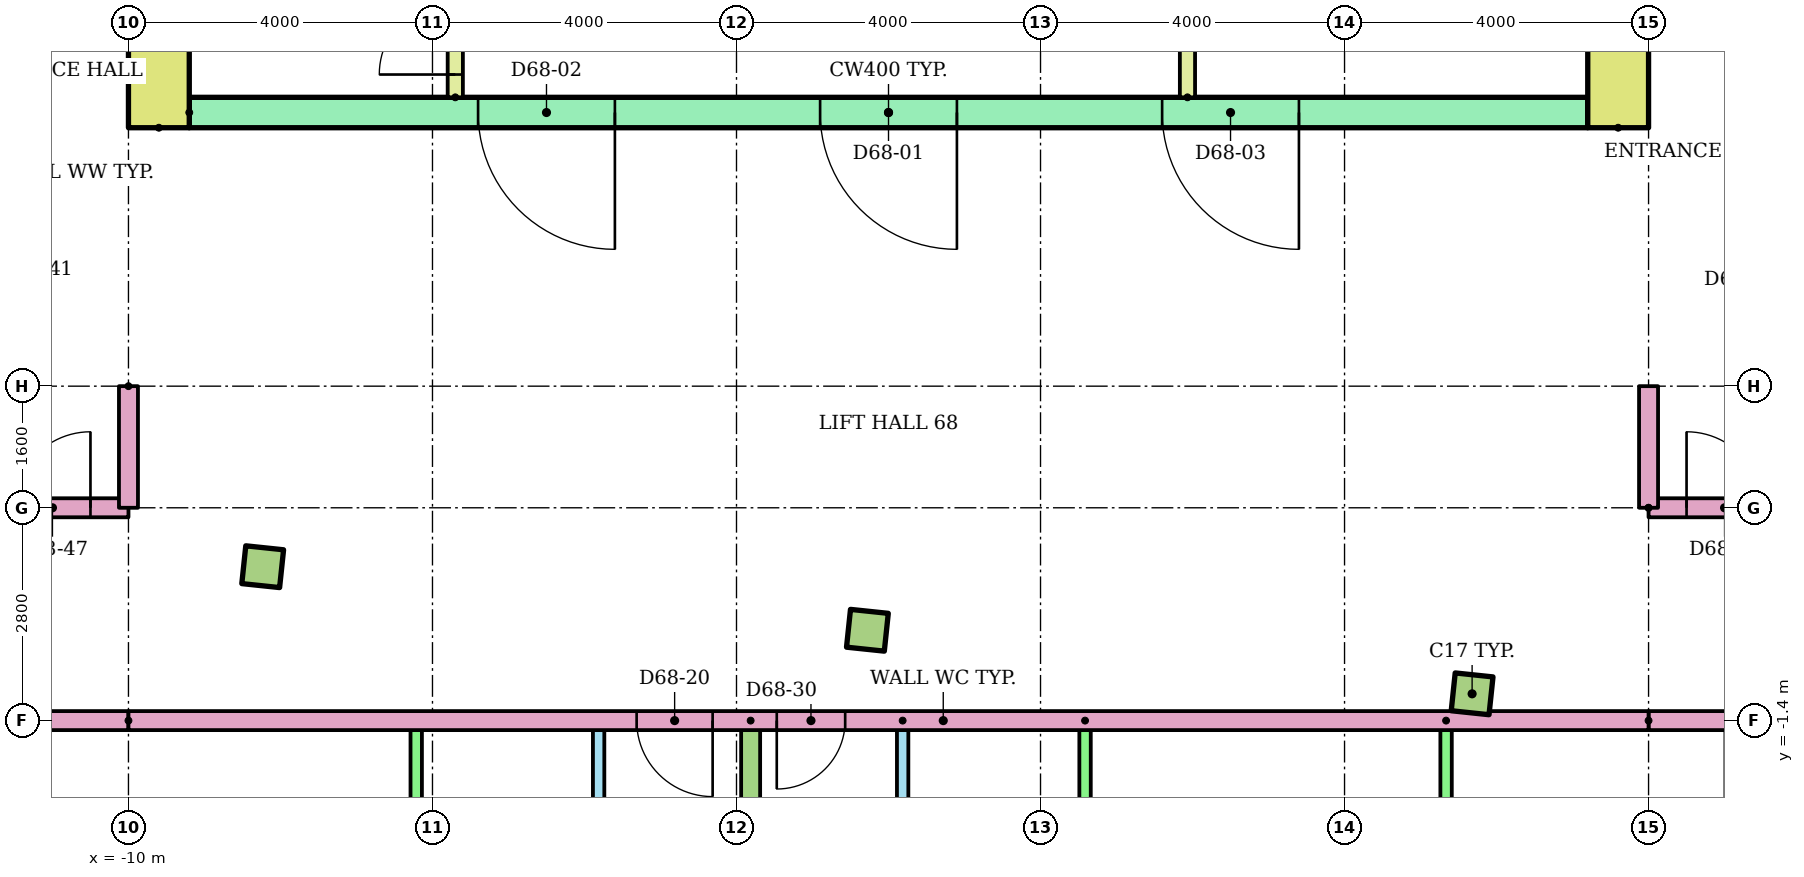
"""IFC4 building model, lengths in metres.
Left out: names, types, materials, properties, quantities, classifications, styles, units other than length and angle.
Written with IfcOpenShell. Run it as: python <this file> out.ifc"""

import sys

from ifc_helpers import new_model, si_unit, direction, frame, frame_2d, origin, origin_2d, place, context, subcontext, project, spatial, rectangle, extrude, element, fill, save


model = new_model("IFC4")
c1 = context("Model", 3, precision=1e-05, world=origin(), true_north=direction((0.0, 1.0)))
c2 = subcontext(c1, "Body", "Model", "MODEL_VIEW")
j1 = project(units=[si_unit("LENGTHUNIT", "METRE"), si_unit("PLANEANGLEUNIT", "RADIAN")], contexts=[c1])
p1 = place(None, origin())
s1 = spatial("IfcSite", under=j1, at=p1, CompositionType="ELEMENT")
p2 = place(p1, origin())
s2 = spatial("IfcBuilding", under=s1, at=p2, CompositionType="ELEMENT")
p3 = place(p2, frame((0.0, 0.0, 262.7)))
s3 = spatial("IfcBuildingStorey", under=s2, at=p3, CompositionType="ELEMENT", Elevation=262.7)
for number, where, z_axis, x_axis in (
    (1, (-8.234, 0.625, 0.0), (0.0, 0.0, 1.0), (0.995, -0.105, 0.0)),
    (2, (-0.278, -0.211, 0.0), (0.0, 0.0, 1.0), (0.995, -0.105, 0.0)),
    (3, (7.678, -1.048, 0.0), (0.0, 0.0, 1.0), (0.995, -0.105, 0.0)),
):
    element("IfcColumn", number, at=place(p3, frame(where, z_axis=z_axis, x_axis=x_axis)), inside=s3, PredefinedType="COLUMN", context=c2, shape_type="SweptSolid", body=[
        extrude(rectangle(XDim=0.5, YDim=0.5, at=origin_2d()), origin(), (0.0, 0.0, 1.0), 3.2),
    ])
for number, where, z_axis, x_axis in (
    (4, (-9.6, 6.4, 0.0), (0.0, 0.0, 1.0), (0.0, 1.0, 0.0)),
    (5, (9.6, 6.4, 0.0), (0.0, 0.0, 1.0), (0.0, 1.0, 0.0)),
):
    element("IfcWall", number, at=place(p3, frame(where, z_axis=z_axis, x_axis=x_axis)), inside=s3, PredefinedType="SHEAR", context=c2, shape_type="SweptSolid", body=[
        extrude(rectangle(XDim=13.6, YDim=0.8, at=frame_2d((6.8, 0.0))), origin(), (0.0, 0.0, 1.0), 2.92),
    ])
p4 = place(p3, frame((-9.2, 6.6, 0.0)))
e6 = element("IfcWall", 6, at=p4, inside=s3, PredefinedType="SHEAR", context=c2, shape_type="SweptSolid", body=[
    extrude(rectangle(XDim=18.4, YDim=0.4, at=frame_2d((9.2, 0.0))), origin(), (0.0, 0.0, 1.0), 2.92),
])
p5 = place(p4, frame((8.3, 0.0, 0.0)))
e7 = element("IfcOpeningElement", 7, at=p5, cuts=e6, PredefinedType="OPENING", context=c2, shape_type="SweptSolid", body=[
    extrude(rectangle(XDim=1.8, YDim=2.1, at=frame_2d((0.9, 1.05))), frame((0.0, 0.21, 0.0), z_axis=(0.0, -1.0, 0.0), x_axis=(1.0, 0.0, 0.0)), (0.0, 0.0, 1.0), 0.42),
])
p6 = place(p4, frame((3.8, 0.0, 0.0)))
e8 = element("IfcOpeningElement", 8, at=p6, cuts=e6, PredefinedType="OPENING", context=c2, shape_type="SweptSolid", body=[
    extrude(rectangle(XDim=1.8, YDim=2.1, at=frame_2d((0.9, 1.05))), frame((0.0, 0.21, 0.0), z_axis=(0.0, -1.0, 0.0), x_axis=(1.0, 0.0, 0.0)), (0.0, 0.0, 1.0), 0.42),
])
p7 = place(p4, frame((12.8, 0.0, 0.0)))
e9 = element("IfcOpeningElement", 9, at=p7, cuts=e6, PredefinedType="OPENING", context=c2, shape_type="SweptSolid", body=[
    extrude(rectangle(XDim=1.8, YDim=2.1, at=frame_2d((0.9, 1.05))), frame((0.0, 0.21, 0.0), z_axis=(0.0, -1.0, 0.0), x_axis=(1.0, 0.0, 0.0)), (0.0, 0.0, 1.0), 0.42),
])
p8 = place(p3, frame((3.933, 6.8, 0.0), z_axis=(0.0, 0.0, 1.0), x_axis=(0.0, 1.0, 0.0)))
e10 = element("IfcWall", 10, at=p8, inside=s3, PredefinedType="PARTITIONING", context=c2, shape_type="SweptSolid", body=[
    extrude(rectangle(XDim=3.3, YDim=0.2, at=frame_2d((1.65, 0.0))), origin(), (0.0, 0.0, 1.0), 2.92),
])
p9 = place(p8, frame((1.1, 0.0, 0.0)))
e11 = element("IfcOpeningElement", 11, at=p9, cuts=e10, PredefinedType="OPENING", context=c2, shape_type="SweptSolid", body=[
    extrude(rectangle(XDim=1.1, YDim=2.1, at=frame_2d((0.55, 1.05))), frame((0.0, 0.11, 0.0), z_axis=(0.0, -1.0, 0.0), x_axis=(1.0, 0.0, 0.0)), (0.0, 0.0, 1.0), 0.22),
])
p10 = place(p3, frame((-5.7, 6.8, 0.0), z_axis=(0.0, 0.0, 1.0), x_axis=(0.0, 1.0, 0.0)))
e12 = element("IfcWall", 12, at=p10, inside=s3, PredefinedType="PARTITIONING", context=c2, shape_type="SweptSolid", body=[
    extrude(rectangle(XDim=1.6, YDim=0.2, at=frame_2d((0.8, 0.0))), origin(), (0.0, 0.0, 1.0), 2.92),
])
p11 = place(p10, frame((0.3, 0.0, 0.0)))
e13 = element("IfcOpeningElement", 13, at=p11, cuts=e12, PredefinedType="OPENING", context=c2, shape_type="SweptSolid", body=[
    extrude(rectangle(XDim=1.0, YDim=2.1, at=frame_2d((0.5, 1.05))), frame((0.0, 0.11, 0.0), z_axis=(0.0, -1.0, 0.0), x_axis=(1.0, 0.0, 0.0)), (0.0, 0.0, 1.0), 0.22),
])
p12 = place(p3, frame((-3.814, -7.047, 0.0), z_axis=(0.0, 0.0, 1.0), x_axis=(0.0, 1.0, 0.0)))
e14 = element("IfcWall", 14, at=p12, inside=s3, PredefinedType="PARTITIONING", context=c2, shape_type="SweptSolid", body=[
    extrude(rectangle(XDim=5.647, YDim=0.15, at=frame_2d((2.823, 0.0))), origin(), (0.0, 0.0, 1.0), 2.4),
])
p13 = place(p12, frame((3.697, 0.0, 0.0)))
e15 = element("IfcOpeningElement", 15, at=p13, cuts=e14, PredefinedType="OPENING", context=c2, shape_type="SweptSolid", body=[
    extrude(rectangle(XDim=0.9, YDim=2.1, at=frame_2d((0.45, 1.05))), frame((0.0, 0.085, 0.0), z_axis=(0.0, -1.0, 0.0), x_axis=(1.0, 0.0, 0.0)), (0.0, 0.0, 1.0), 0.17),
])
p14 = place(p12, frame((0.923, 0.0, 0.0)))
e16 = element("IfcOpeningElement", 16, at=p14, cuts=e14, PredefinedType="OPENING", context=c2, shape_type="SweptSolid", body=[
    extrude(rectangle(XDim=0.8, YDim=2.1, at=frame_2d((0.4, 1.05))), frame((0.0, 0.085, 0.0), z_axis=(0.0, -1.0, 0.0), x_axis=(1.0, 0.0, 0.0)), (0.0, 0.0, 1.0), 0.17),
])
p15 = place(p3, frame((-6.214, -7.047, 0.0), z_axis=(0.0, 0.0, 1.0), x_axis=(0.0, 1.0, 0.0)))
e17 = element("IfcWall", 17, at=p15, inside=s3, PredefinedType="PARTITIONING", context=c2, shape_type="SweptSolid", body=[
    extrude(rectangle(XDim=5.647, YDim=0.15, at=frame_2d((2.823, 0.0))), origin(), (0.0, 0.0, 1.0), 2.4),
])
p16 = place(p3, frame((0.186, -1.4, 0.0), z_axis=(0.0, 0.0, 1.0), x_axis=(0.0, -1.0, 0.0)))
e18 = element("IfcWall", 18, at=p16, inside=s3, PredefinedType="PARTITIONING", context=c2, shape_type="SweptSolid", body=[
    extrude(rectangle(XDim=7.484, YDim=0.15, at=frame_2d((3.742, 0.0))), origin(), (0.0, 0.0, 1.0), 2.4),
])
p17 = place(p16, frame((1.55, 0.0, 0.0)))
e19 = element("IfcOpeningElement", 19, at=p17, cuts=e18, PredefinedType="OPENING", context=c2, shape_type="SweptSolid", body=[
    extrude(rectangle(XDim=0.9, YDim=2.1, at=frame_2d((0.45, 1.05))), frame((0.0, 0.085, 0.0), z_axis=(0.0, -1.0, 0.0), x_axis=(1.0, 0.0, 0.0)), (0.0, 0.0, 1.0), 0.17),
])
p18 = place(p16, frame((4.966, 0.0, 0.0)))
e20 = element("IfcOpeningElement", 20, at=p18, cuts=e18, PredefinedType="OPENING", context=c2, shape_type="SweptSolid", body=[
    extrude(rectangle(XDim=0.8, YDim=2.1, at=frame_2d((0.4, 1.05))), frame((0.0, 0.085, 0.0), z_axis=(0.0, -1.0, 0.0), x_axis=(1.0, 0.0, 0.0)), (0.0, 0.0, 1.0), 0.17),
])
for number, where, z_axis, x_axis in (
    (21, (2.586, -1.4, 0.0), (0.0, 0.0, 1.0), (0.0, -1.0, 0.0)),
    (22, (7.336, -1.4, 0.0), (0.0, 0.0, 1.0), (0.0, -1.0, 0.0)),
):
    element("IfcWall", number, at=place(p3, frame(where, z_axis=z_axis, x_axis=x_axis)), inside=s3, PredefinedType="PARTITIONING", context=c2, shape_type="SweptSolid", body=[
        extrude(rectangle(XDim=7.484, YDim=0.15, at=frame_2d((3.742, 0.0))), origin(), (0.0, 0.0, 1.0), 2.4),
    ])
p19 = place(p3, frame((-1.814, -1.4, 0.0), z_axis=(0.0, 0.0, 1.0), x_axis=(0.0, -1.0, 0.0)))
e23 = element("IfcWall", 23, at=p19, inside=s3, PredefinedType="PARTITIONING", context=c2, shape_type="SweptSolid", body=[
    extrude(rectangle(XDim=13.341, YDim=0.25, at=frame_2d((6.67, 0.0))), origin(), (0.0, 0.0, 1.0), 2.4),
])
p20 = place(p3, frame((-10.0, -1.4, 0.0), z_axis=(0.0, 0.0, 1.0), x_axis=(-1.0, 0.0, 0.0)))
e24 = element("IfcWall", 24, at=p20, inside=s3, PredefinedType="PARTITIONING", context=c2, shape_type="SweptSolid", body=[
    extrude(rectangle(XDim=13.56, YDim=0.25, at=frame_2d((6.78, 0.0))), origin(), (0.0, 0.0, 1.0), 2.4),
])
p21 = place(p3, frame((25.0, -1.4, 0.0), z_axis=(0.0, 0.0, 1.0), x_axis=(-1.0, 0.0, 0.0)))
e25 = element("IfcWall", 25, at=p21, inside=s3, PredefinedType="PARTITIONING", context=c2, shape_type="SweptSolid", body=[
    extrude(rectangle(XDim=15.0, YDim=0.25, at=frame_2d((7.5, 0.0))), origin(), (0.0, 0.0, 1.0), 2.4),
])
p22 = place(p21, frame((9.658, 0.0, 0.0)))
e26 = element("IfcOpeningElement", 26, at=p22, cuts=e25, PredefinedType="OPENING", context=c2, shape_type="SweptSolid", body=[
    extrude(rectangle(XDim=0.9, YDim=2.1, at=frame_2d((0.45, 1.05))), frame((0.0, 0.135, 0.0), z_axis=(0.0, -1.0, 0.0), x_axis=(1.0, 0.0, 0.0)), (0.0, 0.0, 1.0), 0.27),
])
p23 = place(p3, frame((-23.265, 1.4, 0.0)))
e27 = element("IfcWall", 27, at=p23, inside=s3, PredefinedType="PARTITIONING", context=c2, shape_type="SweptSolid", body=[
    extrude(rectangle(XDim=13.265, YDim=0.25, at=frame_2d((6.633, 0.0))), origin(), (0.0, 0.0, 1.0), 2.4),
])
p24 = place(p23, frame((11.765, 0.0, 0.0)))
e28 = element("IfcOpeningElement", 28, at=p24, cuts=e27, PredefinedType="OPENING", context=c2, shape_type="SweptSolid", body=[
    extrude(rectangle(XDim=1.0, YDim=2.1, at=frame_2d((0.5, 1.05))), frame((0.0, 0.135, 0.0), z_axis=(0.0, -1.0, 0.0), x_axis=(1.0, 0.0, 0.0)), (0.0, 0.0, 1.0), 0.27),
])
p25 = place(p3, frame((10.0, 1.4, 0.0)))
e29 = element("IfcWall", 29, at=p25, inside=s3, PredefinedType="PARTITIONING", context=c2, shape_type="SweptSolid", body=[
    extrude(rectangle(XDim=15.0, YDim=0.25, at=frame_2d((7.5, 0.0))), origin(), (0.0, 0.0, 1.0), 2.4),
])
p26 = place(p25, frame((0.5, 0.0, 0.0)))
e30 = element("IfcOpeningElement", 30, at=p26, cuts=e29, PredefinedType="OPENING", context=c2, shape_type="SweptSolid", body=[
    extrude(rectangle(XDim=1.0, YDim=2.1, at=frame_2d((0.5, 1.05))), frame((0.0, 0.135, 0.0), z_axis=(0.0, -1.0, 0.0), x_axis=(1.0, 0.0, 0.0)), (0.0, 0.0, 1.0), 0.27),
])
p27 = place(p3, frame((10.0, -1.4, 0.0), z_axis=(0.0, 0.0, 1.0), x_axis=(-1.0, 0.0, 0.0)))
e31 = element("IfcWall", 31, at=p27, inside=s3, PredefinedType="PARTITIONING", context=c2, shape_type="SweptSolid", body=[
    extrude(rectangle(XDim=20.0, YDim=0.25, at=frame_2d((10.0, 0.0))), origin(), (0.0, 0.0, 1.0), 2.4),
])
p28 = place(p27, frame((12.314, 0.0, 0.0)))
e32 = element("IfcOpeningElement", 32, at=p28, cuts=e31, PredefinedType="OPENING", context=c2, shape_type="SweptSolid", body=[
    extrude(rectangle(XDim=1.0, YDim=2.1, at=frame_2d((0.5, 1.05))), frame((0.0, 0.135, 0.0), z_axis=(0.0, -1.0, 0.0), x_axis=(1.0, 0.0, 0.0)), (0.0, 0.0, 1.0), 0.27),
])
p29 = place(p27, frame((10.57, 0.0, 0.0)))
e33 = element("IfcOpeningElement", 33, at=p29, cuts=e31, PredefinedType="OPENING", context=c2, shape_type="SweptSolid", body=[
    extrude(rectangle(XDim=0.9, YDim=2.1, at=frame_2d((0.45, 1.05))), frame((0.0, 0.135, 0.0), z_axis=(0.0, -1.0, 0.0), x_axis=(1.0, 0.0, 0.0)), (0.0, 0.0, 1.0), 0.27),
])
for number, where, z_axis, x_axis in (
    (34, (-10.0, 3.0, 0.0), (0.0, 0.0, 1.0), (0.0, -1.0, 0.0)),
    (35, (10.0, 1.4, 0.0), (0.0, 0.0, 1.0), (0.0, 1.0, 0.0)),
):
    element("IfcWall", number, at=place(p3, frame(where, z_axis=z_axis, x_axis=x_axis)), inside=s3, PredefinedType="PARTITIONING", context=c2, shape_type="SweptSolid", body=[
        extrude(rectangle(XDim=1.6, YDim=0.25, at=frame_2d((0.8, 0.0))), origin(), (0.0, 0.0, 1.0), 2.4),
    ])
p30 = place(p5, frame((1.8, 0.0, 0.0), z_axis=(0.0, 0.0, 1.0), x_axis=(-1.0, 0.0, 0.0)))
e36 = element("IfcDoor", 36, at=p30, inside=s3, OperationType="DOUBLE_DOOR_SINGLE_SWING", PredefinedType="DOOR", context=c2, shape_type="SweptSolid", body=[
    extrude(rectangle(XDim=1.8, YDim=2.1, at=frame_2d((0.9, 1.05))), frame((0.0, 0.025, 0.0), z_axis=(0.0, -1.0, 0.0), x_axis=(1.0, 0.0, 0.0)), (0.0, 0.0, 1.0), 0.05),
])
fill(e7, e36)
p31 = place(p6, frame((1.8, 0.0, 0.0), z_axis=(0.0, 0.0, 1.0), x_axis=(-1.0, 0.0, 0.0)))
e37 = element("IfcDoor", 37, at=p31, inside=s3, OperationType="DOUBLE_DOOR_SINGLE_SWING", PredefinedType="DOOR", context=c2, shape_type="SweptSolid", body=[
    extrude(rectangle(XDim=1.8, YDim=2.1, at=frame_2d((0.9, 1.05))), frame((0.0, 0.025, 0.0), z_axis=(0.0, -1.0, 0.0), x_axis=(1.0, 0.0, 0.0)), (0.0, 0.0, 1.0), 0.05),
])
fill(e8, e37)
p32 = place(p7, frame((1.8, 0.0, 0.0), z_axis=(0.0, 0.0, 1.0), x_axis=(-1.0, 0.0, 0.0)))
e38 = element("IfcDoor", 38, at=p32, inside=s3, OperationType="DOUBLE_DOOR_SINGLE_SWING", PredefinedType="DOOR", context=c2, shape_type="SweptSolid", body=[
    extrude(rectangle(XDim=1.8, YDim=2.1, at=frame_2d((0.9, 1.05))), frame((0.0, 0.025, 0.0), z_axis=(0.0, -1.0, 0.0), x_axis=(1.0, 0.0, 0.0)), (0.0, 0.0, 1.0), 0.05),
])
fill(e9, e38)
p33 = place(p11, origin())
e39 = element("IfcDoor", 39, at=p33, inside=s3, OperationType="SINGLE_SWING_LEFT", PredefinedType="DOOR", context=c2, shape_type="SweptSolid", body=[
    extrude(rectangle(XDim=1.0, YDim=2.1, at=frame_2d((0.5, 1.05))), frame((0.0, 0.025, 0.0), z_axis=(0.0, -1.0, 0.0), x_axis=(1.0, 0.0, 0.0)), (0.0, 0.0, 1.0), 0.05),
])
fill(e13, e39)
p34 = place(p28, origin())
e40 = element("IfcDoor", 40, at=p34, inside=s3, OperationType="SINGLE_SWING_LEFT", PredefinedType="DOOR", context=c2, shape_type="SweptSolid", body=[
    extrude(rectangle(XDim=1.0, YDim=2.1, at=frame_2d((0.5, 1.05))), frame((0.0, 0.025, 0.0), z_axis=(0.0, -1.0, 0.0), x_axis=(1.0, 0.0, 0.0)), (0.0, 0.0, 1.0), 0.05),
])
fill(e32, e40)
p35 = place(p29, origin())
e41 = element("IfcDoor", 41, at=p35, inside=s3, OperationType="SINGLE_SWING_RIGHT", PredefinedType="DOOR", context=c2, shape_type="SweptSolid", body=[
    extrude(rectangle(XDim=0.9, YDim=2.1, at=frame_2d((0.45, 1.05))), frame((0.0, 0.025, 0.0), z_axis=(0.0, -1.0, 0.0), x_axis=(1.0, 0.0, 0.0)), (0.0, 0.0, 1.0), 0.05),
])
fill(e33, e41)
p36 = place(p24, origin())
e42 = element("IfcDoor", 42, at=p36, inside=s3, OperationType="SINGLE_SWING_RIGHT", PredefinedType="DOOR", context=c2, shape_type="SweptSolid", body=[
    extrude(rectangle(XDim=1.0, YDim=2.1, at=frame_2d((0.5, 1.05))), frame((0.0, 0.025, 0.0), z_axis=(0.0, -1.0, 0.0), x_axis=(1.0, 0.0, 0.0)), (0.0, 0.0, 1.0), 0.05),
])
fill(e28, e42)
p37 = place(p26, origin())
e43 = element("IfcDoor", 43, at=p37, inside=s3, OperationType="SINGLE_SWING_LEFT", PredefinedType="DOOR", context=c2, shape_type="SweptSolid", body=[
    extrude(rectangle(XDim=1.0, YDim=2.1, at=frame_2d((0.5, 1.05))), frame((0.0, 0.025, 0.0), z_axis=(0.0, -1.0, 0.0), x_axis=(1.0, 0.0, 0.0)), (0.0, 0.0, 1.0), 0.05),
])
fill(e30, e43)
save(model, sys.argv[1])
